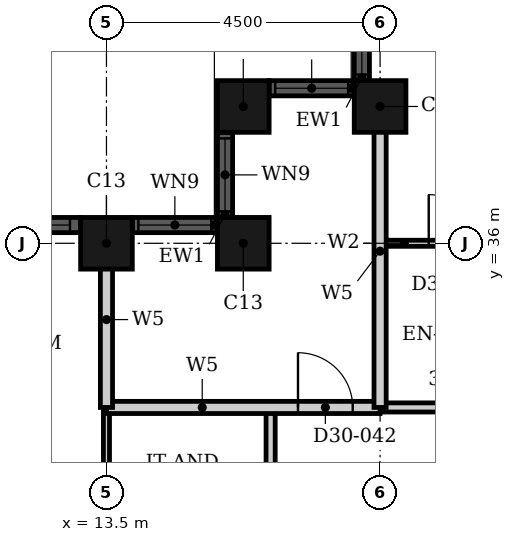
"""IFC4 building model, lengths in metres.
Left out: names, types, materials, properties, quantities, classifications, styles, units other than length and angle.
Written with IfcOpenShell. Run it as: python <this file> out.ifc"""

import sys

from ifc_helpers import new_model, si_unit, direction, frame, frame_2d, origin, origin_2d, place, context, subcontext, project, spatial, rectangle, hollow_rectangle, extrude, element, fill, save


model = new_model("IFC4")
c1 = context("Model", 3, precision=1e-05, world=origin(), true_north=direction((0.0, 1.0)))
c2 = subcontext(c1, "Body", "Model", "MODEL_VIEW")
j1 = project(units=[si_unit("LENGTHUNIT", "METRE"), si_unit("PLANEANGLEUNIT", "RADIAN")], contexts=[c1])
p1 = place(None, origin())
s1 = spatial("IfcSite", under=j1, at=p1, CompositionType="ELEMENT")
p2 = place(p1, origin())
s2 = spatial("IfcBuilding", under=s1, at=p2, CompositionType="ELEMENT")
p3 = place(p2, frame((0.0, 0.0, 122.4)))
s3 = spatial("IfcBuildingStorey", under=s2, at=p3, CompositionType="ELEMENT", Elevation=122.4)
for number, where, z_axis, x_axis in (
    (1, (18.0, 38.25, 0.0), (0.0, 0.0, 1.0), (1.0, 0.0, 0.0)),
    (2, (15.75, 38.25, 0.0), (0.0, 0.0, 1.0), (1.0, 0.0, 0.0)),
    (3, (15.75, 36.0, 0.0), (0.0, 0.0, 1.0), (1.0, 0.0, 0.0)),
    (4, (13.5, 36.0, 0.0), (0.0, 0.0, 1.0), (1.0, 0.0, 0.0)),
):
    element("IfcColumn", number, at=place(p3, frame(where, z_axis=z_axis, x_axis=x_axis)), inside=s3, PredefinedType="COLUMN", context=c2, shape_type="SweptSolid", body=[
        extrude(hollow_rectangle(XDim=0.85, YDim=0.85, WallThickness=0.026, at=origin_2d()), origin(), (0.0, 0.0, 1.0), 3.6),
    ])
p4 = place(p3, frame((17.7, 40.075, 0.0), z_axis=(0.0, 0.0, 1.0), x_axis=(0.0, -1.0, 0.0)))
e5 = element("IfcWall", 5, at=p4, inside=s3, PredefinedType="SOLIDWALL", context=c2, shape_type="SweptSolid", body=[
    extrude(rectangle(XDim=1.4, YDim=0.25, at=frame_2d((0.7, 0.0))), origin(), (0.0, 0.0, 1.0), 3.6),
])
p5 = place(p4, frame((0.1, 0.0, 0.9)))
e6 = element("IfcOpeningElement", 6, at=p5, cuts=e5, PredefinedType="OPENING", context=c2, shape_type="SweptSolid", body=[
    extrude(rectangle(XDim=1.2, YDim=2.08, at=frame_2d((0.6, 1.04))), frame((0.0, 0.135, 0.0), z_axis=(0.0, -1.0, 0.0), x_axis=(1.0, 0.0, 0.0)), (0.0, 0.0, 1.0), 0.27),
])
p6 = place(p3, frame((17.575, 38.55, 0.0), z_axis=(0.0, 0.0, 1.0), x_axis=(-1.0, 0.0, 0.0)))
e7 = element("IfcWall", 7, at=p6, inside=s3, PredefinedType="SOLIDWALL", context=c2, shape_type="SweptSolid", body=[
    extrude(rectangle(XDim=1.4, YDim=0.25, at=frame_2d((0.7, 0.0))), origin(), (0.0, 0.0, 1.0), 3.6),
])
p7 = place(p6, frame((0.1, 0.0, 0.9)))
e8 = element("IfcOpeningElement", 8, at=p7, cuts=e7, PredefinedType="OPENING", context=c2, shape_type="SweptSolid", body=[
    extrude(rectangle(XDim=1.2, YDim=2.08, at=frame_2d((0.6, 1.04))), frame((0.0, 0.135, 0.0), z_axis=(0.0, -1.0, 0.0), x_axis=(1.0, 0.0, 0.0)), (0.0, 0.0, 1.0), 0.27),
])
p8 = place(p3, frame((15.45, 37.825, 0.0), z_axis=(0.0, 0.0, 1.0), x_axis=(0.0, -1.0, 0.0)))
e9 = element("IfcWall", 9, at=p8, inside=s3, PredefinedType="SOLIDWALL", context=c2, shape_type="SweptSolid", body=[
    extrude(rectangle(XDim=1.4, YDim=0.25, at=frame_2d((0.7, 0.0))), origin(), (0.0, 0.0, 1.0), 3.6),
])
p9 = place(p8, frame((0.1, 0.0, 0.9)))
e10 = element("IfcOpeningElement", 10, at=p9, cuts=e9, PredefinedType="OPENING", context=c2, shape_type="SweptSolid", body=[
    extrude(rectangle(XDim=1.2, YDim=2.08, at=frame_2d((0.6, 1.04))), frame((0.0, 0.135, 0.0), z_axis=(0.0, -1.0, 0.0), x_axis=(1.0, 0.0, 0.0)), (0.0, 0.0, 1.0), 0.27),
])
p10 = place(p3, frame((15.325, 36.3, 0.0), z_axis=(0.0, 0.0, 1.0), x_axis=(-1.0, 0.0, 0.0)))
e11 = element("IfcWall", 11, at=p10, inside=s3, PredefinedType="SOLIDWALL", context=c2, shape_type="SweptSolid", body=[
    extrude(rectangle(XDim=1.4, YDim=0.25, at=frame_2d((0.7, 0.0))), origin(), (0.0, 0.0, 1.0), 3.6),
])
p11 = place(p10, frame((0.1, 0.0, 0.9)))
e12 = element("IfcOpeningElement", 12, at=p11, cuts=e11, PredefinedType="OPENING", context=c2, shape_type="SweptSolid", body=[
    extrude(rectangle(XDim=1.2, YDim=2.08, at=frame_2d((0.6, 1.04))), frame((0.0, 0.135, 0.0), z_axis=(0.0, -1.0, 0.0), x_axis=(1.0, 0.0, 0.0)), (0.0, 0.0, 1.0), 0.27),
])
p12 = place(p3, frame((13.075, 36.3, 0.0), z_axis=(0.0, 0.0, 1.0), x_axis=(-1.0, 0.0, 0.0)))
e13 = element("IfcWall", 13, at=p12, inside=s3, PredefinedType="SOLIDWALL", context=c2, shape_type="SweptSolid", body=[
    extrude(rectangle(XDim=8.15, YDim=0.25, at=frame_2d((4.075, 0.0))), origin(), (0.0, 0.0, 1.0), 3.6),
])
p13 = place(p12, frame((0.175, 0.0, 0.9)))
e14 = element("IfcOpeningElement", 14, at=p13, cuts=e13, PredefinedType="OPENING", context=c2, shape_type="SweptSolid", body=[
    extrude(rectangle(XDim=3.3, YDim=2.08, at=frame_2d((1.65, 1.04))), frame((0.0, 0.135, 0.0), z_axis=(0.0, -1.0, 0.0), x_axis=(1.0, 0.0, 0.0)), (0.0, 0.0, 1.0), 0.27),
])
p14 = place(p12, frame((4.675, 0.0, 0.9)))
e15 = element("IfcOpeningElement", 15, at=p14, cuts=e13, PredefinedType="OPENING", context=c2, shape_type="SweptSolid", body=[
    extrude(rectangle(XDim=3.3, YDim=2.08, at=frame_2d((1.65, 1.04))), frame((0.0, 0.135, 0.0), z_axis=(0.0, -1.0, 0.0), x_axis=(1.0, 0.0, 0.0)), (0.0, 0.0, 1.0), 0.27),
])
p15 = place(p3, frame((18.0, 33.3, 0.0), z_axis=(0.0, 0.0, 1.0), x_axis=(1.0, 0.0, 0.0)))
e16 = element("IfcWall", 16, at=p15, inside=s3, PredefinedType="PARTITIONING", context=c2, shape_type="SweptSolid", body=[
    extrude(rectangle(XDim=13.5, YDim=0.15, at=frame_2d((6.75, 0.0))), origin(), (0.0, 0.0, 1.0), 3.3),
])
p16 = place(p15, frame((2.95, 0.0, 0.0)))
e17 = element("IfcOpeningElement", 17, at=p16, cuts=e16, PredefinedType="OPENING", context=c2, shape_type="SweptSolid", body=[
    extrude(rectangle(XDim=1.0, YDim=2.1, at=frame_2d((0.5, 1.05))), frame((0.0, 0.085, 0.0), z_axis=(0.0, -1.0, 0.0), x_axis=(1.0, 0.0, 0.0)), (0.0, 0.0, 1.0), 0.17),
])
p17 = place(p15, frame((5.85, 0.0, 0.0)))
e18 = element("IfcOpeningElement", 18, at=p17, cuts=e16, PredefinedType="OPENING", context=c2, shape_type="SweptSolid", body=[
    extrude(rectangle(XDim=0.9, YDim=2.1, at=frame_2d((0.45, 1.05))), frame((0.0, 0.085, 0.0), z_axis=(0.0, -1.0, 0.0), x_axis=(1.0, 0.0, 0.0)), (0.0, 0.0, 1.0), 0.17),
])
p18 = place(p15, frame((10.35, 0.0, 0.0)))
e19 = element("IfcOpeningElement", 19, at=p18, cuts=e16, PredefinedType="OPENING", context=c2, shape_type="SweptSolid", body=[
    extrude(rectangle(XDim=0.9, YDim=2.1, at=frame_2d((0.45, 1.05))), frame((0.0, 0.085, 0.0), z_axis=(0.0, -1.0, 0.0), x_axis=(1.0, 0.0, 0.0)), (0.0, 0.0, 1.0), 0.17),
])
p19 = place(p3, frame((16.2, 27.0, 0.0), z_axis=(0.0, 0.0, 1.0), x_axis=(0.0, 1.0, 0.0)))
e20 = element("IfcWall", 20, at=p19, inside=s3, PredefinedType="PARTITIONING", context=c2, shape_type="SweptSolid", body=[
    extrude(rectangle(XDim=6.3, YDim=0.15, at=frame_2d((3.15, 0.0))), origin(), (0.0, 0.0, 1.0), 3.3),
])
p20 = place(p19, frame((2.55, 0.0, 0.0)))
e21 = element("IfcOpeningElement", 21, at=p20, cuts=e20, PredefinedType="OPENING", context=c2, shape_type="SweptSolid", body=[
    extrude(rectangle(XDim=0.9, YDim=2.1, at=frame_2d((0.45, 1.05))), frame((0.0, 0.085, 0.0), z_axis=(0.0, -1.0, 0.0), x_axis=(1.0, 0.0, 0.0)), (0.0, 0.0, 1.0), 0.17),
])
p21 = place(p3, frame((13.5, 27.0, 0.0), z_axis=(0.0, 0.0, 1.0), x_axis=(0.0, 1.0, 0.0)))
e22 = element("IfcWall", 22, at=p21, inside=s3, PredefinedType="PARTITIONING", context=c2, shape_type="SweptSolid", body=[
    extrude(rectangle(XDim=6.3, YDim=0.1, at=frame_2d((3.15, 0.0))), origin(), (0.0, 0.0, 1.0), 2.38),
])
p22 = place(p3, frame((18.0, 36.0, 0.0), z_axis=(0.0, 0.0, 1.0), x_axis=(1.0, 0.0, 0.0)))
e23 = element("IfcWall", 23, at=p22, inside=s3, PredefinedType="PARTITIONING", context=c2, shape_type="SweptSolid", body=[
    extrude(rectangle(XDim=2.4, YDim=0.1, at=frame_2d((1.2, 0.0))), origin(), (0.0, 0.0, 1.0), 3.3),
])
p23 = place(p22, frame((0.8, 0.0, 0.0)))
e24 = element("IfcOpeningElement", 24, at=p23, cuts=e23, PredefinedType="OPENING", context=c2, shape_type="SweptSolid", body=[
    extrude(rectangle(XDim=0.8, YDim=2.1, at=frame_2d((0.4, 1.05))), frame((0.0, 0.06, 0.0), z_axis=(0.0, -1.0, 0.0), x_axis=(1.0, 0.0, 0.0)), (0.0, 0.0, 1.0), 0.12),
])
p24 = place(p3, frame((13.5, 33.3, 0.0), z_axis=(0.0, 0.0, 1.0), x_axis=(1.0, 0.0, 0.0)))
e25 = element("IfcWall", 25, at=p24, inside=s3, PredefinedType="PARTITIONING", context=c2, shape_type="SweptSolid", body=[
    extrude(rectangle(XDim=4.5, YDim=0.2, at=frame_2d((2.25, 0.0))), origin(), (0.0, 0.0, 1.0), 3.3),
])
p25 = place(p24, frame((3.15, 0.0, 0.0)))
e26 = element("IfcOpeningElement", 26, at=p25, cuts=e25, PredefinedType="OPENING", context=c2, shape_type="SweptSolid", body=[
    extrude(rectangle(XDim=0.9, YDim=2.1, at=frame_2d((0.45, 1.05))), frame((0.0, 0.11, 0.0), z_axis=(0.0, -1.0, 0.0), x_axis=(1.0, 0.0, 0.0)), (0.0, 0.0, 1.0), 0.22),
])
p26 = place(p3, frame((13.5, 33.3, 0.0), z_axis=(0.0, 0.0, 1.0), x_axis=(0.0, 1.0, 0.0)))
e27 = element("IfcWall", 27, at=p26, inside=s3, PredefinedType="PARTITIONING", context=c2, shape_type="SweptSolid", body=[
    extrude(rectangle(XDim=2.89, YDim=0.2, at=frame_2d((1.445, 0.0))), origin(), (0.0, 0.0, 1.0), 2.38),
])
p27 = place(p3, frame((18.0, 33.3, 0.0), z_axis=(0.0, 0.0, 1.0), x_axis=(0.0, 1.0, 0.0)))
e28 = element("IfcWall", 28, at=p27, inside=s3, PredefinedType="PARTITIONING", context=c2, shape_type="SweptSolid", body=[
    extrude(rectangle(XDim=5.14, YDim=0.2, at=frame_2d((2.57, 0.0))), origin(), (0.0, 0.0, 1.0), 3.3),
])
p28 = place(p5, origin())
e29 = element("IfcWindow", 29, at=p28, inside=s3, PartitioningType="SINGLE_PANEL", PredefinedType="WINDOW", context=c2, shape_type="SweptSolid", body=[
    extrude(rectangle(XDim=1.2, YDim=2.08, at=frame_2d((0.6, 1.04))), frame((0.0, 0.03, 0.0), z_axis=(0.0, -1.0, 0.0), x_axis=(1.0, 0.0, 0.0)), (0.0, 0.0, 1.0), 0.06),
])
fill(e6, e29)
p29 = place(p7, origin())
e30 = element("IfcWindow", 30, at=p29, inside=s3, PartitioningType="SINGLE_PANEL", PredefinedType="WINDOW", context=c2, shape_type="SweptSolid", body=[
    extrude(rectangle(XDim=1.2, YDim=2.08, at=frame_2d((0.6, 1.04))), frame((0.0, 0.03, 0.0), z_axis=(0.0, -1.0, 0.0), x_axis=(1.0, 0.0, 0.0)), (0.0, 0.0, 1.0), 0.06),
])
fill(e8, e30)
p30 = place(p9, origin())
e31 = element("IfcWindow", 31, at=p30, inside=s3, PartitioningType="SINGLE_PANEL", PredefinedType="WINDOW", context=c2, shape_type="SweptSolid", body=[
    extrude(rectangle(XDim=1.2, YDim=2.08, at=frame_2d((0.6, 1.04))), frame((0.0, 0.03, 0.0), z_axis=(0.0, -1.0, 0.0), x_axis=(1.0, 0.0, 0.0)), (0.0, 0.0, 1.0), 0.06),
])
fill(e10, e31)
p31 = place(p11, origin())
e32 = element("IfcWindow", 32, at=p31, inside=s3, PartitioningType="SINGLE_PANEL", PredefinedType="WINDOW", context=c2, shape_type="SweptSolid", body=[
    extrude(rectangle(XDim=1.2, YDim=2.08, at=frame_2d((0.6, 1.04))), frame((0.0, 0.03, 0.0), z_axis=(0.0, -1.0, 0.0), x_axis=(1.0, 0.0, 0.0)), (0.0, 0.0, 1.0), 0.06),
])
fill(e12, e32)
p32 = place(p13, origin())
e33 = element("IfcWindow", 33, at=p32, inside=s3, PartitioningType="SINGLE_PANEL", PredefinedType="WINDOW", context=c2, shape_type="SweptSolid", body=[
    extrude(rectangle(XDim=3.3, YDim=2.08, at=frame_2d((1.65, 1.04))), frame((0.0, 0.03, 0.0), z_axis=(0.0, -1.0, 0.0), x_axis=(1.0, 0.0, 0.0)), (0.0, 0.0, 1.0), 0.06),
])
fill(e14, e33)
p33 = place(p23, origin())
e34 = element("IfcDoor", 34, at=p33, inside=s3, OperationType="SINGLE_SWING_LEFT", PredefinedType="DOOR", context=c2, shape_type="SweptSolid", body=[
    extrude(rectangle(XDim=0.8, YDim=2.1, at=frame_2d((0.4, 1.05))), frame((0.0, 0.025, 0.0), z_axis=(0.0, -1.0, 0.0), x_axis=(1.0, 0.0, 0.0)), (0.0, 0.0, 1.0), 0.05),
])
fill(e24, e34)
p34 = place(p25, origin())
e35 = element("IfcDoor", 35, at=p34, inside=s3, OperationType="SINGLE_SWING_LEFT", PredefinedType="DOOR", context=c2, shape_type="SweptSolid", body=[
    extrude(rectangle(XDim=0.9, YDim=2.1, at=frame_2d((0.45, 1.05))), frame((0.0, 0.025, 0.0), z_axis=(0.0, -1.0, 0.0), x_axis=(1.0, 0.0, 0.0)), (0.0, 0.0, 1.0), 0.05),
])
fill(e26, e35)
save(model, sys.argv[1])
